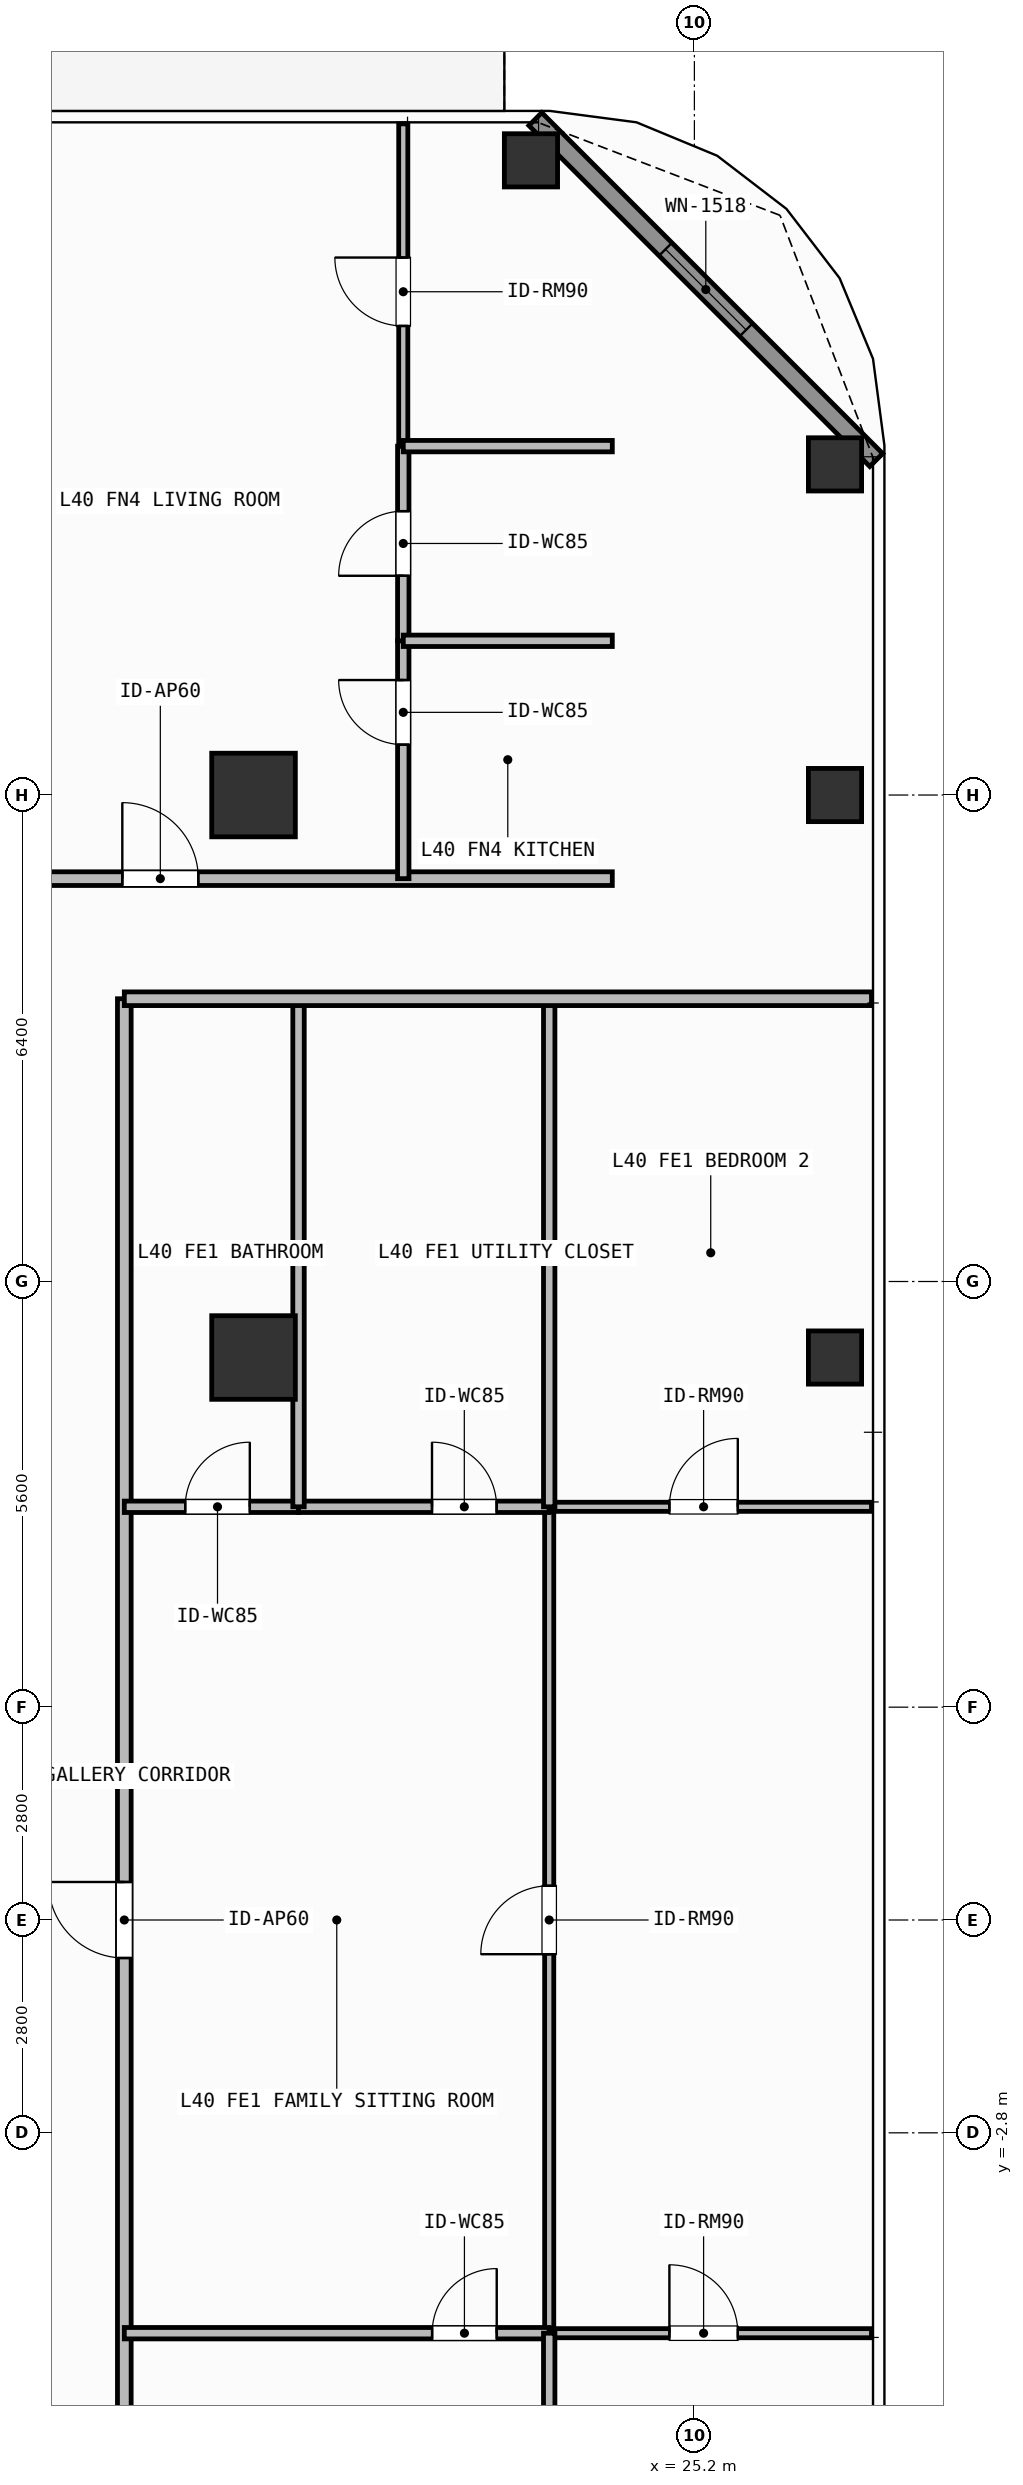
"""IFC4 building model, lengths in metres.
Left out: names, types, materials, properties, quantities, classifications, styles, units other than length and angle.
Written with IfcOpenShell. Run it as: python <this file> out.ifc"""

import sys

from ifc_helpers import new_model, si_unit, direction, frame, frame_2d, origin, origin_2d, place, context, subcontext, project, spatial, rectangle, hollow_rectangle, extrude, element, fill, save


model = new_model("IFC4")
c1 = context("Model", 3, precision=1e-05, world=origin(), true_north=direction((0.0, 1.0)))
c2 = subcontext(c1, "Body", "Model", "MODEL_VIEW")
j1 = project(units=[si_unit("LENGTHUNIT", "METRE"), si_unit("PLANEANGLEUNIT", "RADIAN")], contexts=[c1])
p1 = place(None, origin())
s1 = spatial("IfcSite", under=j1, at=p1, CompositionType="ELEMENT")
p2 = place(p1, origin())
s2 = spatial("IfcBuilding", under=s1, at=p2, CompositionType="ELEMENT")
p3 = place(p2, frame((0.0, 0.0, 164.1)))
s3 = spatial("IfcBuildingStorey", under=s2, at=p3, CompositionType="ELEMENT", Elevation=164.1)
for number, where, z_axis, x_axis in (
    (1, (19.4, 7.4, 0.0), (0.0, 0.0, 1.0), (1.0, 0.0, 0.0)),
    (2, (19.4, 14.8, 0.0), (0.0, 0.0, 1.0), (1.0, 0.0, 0.0)),
):
    element("IfcColumn", number, at=place(p3, frame(where, z_axis=z_axis, x_axis=x_axis)), inside=s3, PredefinedType="COLUMN", context=c2, shape_type="SweptSolid", body=[
        extrude(rectangle(XDim=1.1, YDim=1.1, at=origin_2d()), origin(), (0.0, 0.0, 1.0), 3.9),
    ])
for number, where, z_axis, x_axis in (
    (3, (23.05, 23.15, 0.0), (0.0, 0.0, 1.0), (1.0, 0.0, 0.0)),
    (4, (27.05, 19.15, 0.0), (0.0, 0.0, 1.0), (1.0, 0.0, 0.0)),
    (5, (27.05, 7.4, 0.0), (0.0, 0.0, 1.0), (1.0, 0.0, 0.0)),
    (6, (27.05, 14.8, 0.0), (0.0, 0.0, 1.0), (1.0, 0.0, 0.0)),
):
    element("IfcColumn", number, at=place(p3, frame(where, z_axis=z_axis, x_axis=x_axis)), inside=s3, PredefinedType="COLUMN", context=c2, shape_type="SweptSolid", body=[
        extrude(hollow_rectangle(XDim=0.7, YDim=0.7, WallThickness=0.032, at=origin_2d()), origin(), (0.0, 0.0, 1.0), 3.9),
    ])
p4 = place(p3, frame((23.108, 23.692, 0.0), z_axis=(0.0, 0.0, 1.0), x_axis=(0.707087534163, -0.707126027686, 0.0)))
e7 = element("IfcWall", 7, at=p4, inside=s3, PredefinedType="SOLIDWALL", context=c2, shape_type="SweptSolid", body=[
    extrude(rectangle(XDim=6.342, YDim=0.24, at=frame_2d((3.171, 0.0))), origin(), (0.0, 0.0, 1.0), 3.62),
])
p5 = place(p4, frame((2.421, 0.0, 0.8)))
e8 = element("IfcOpeningElement", 8, at=p5, cuts=e7, PredefinedType="OPENING", context=c2, shape_type="SweptSolid", body=[
    extrude(rectangle(XDim=1.5, YDim=1.85, at=frame_2d((0.75, 0.925))), frame((0.0, 0.13, 0.0), z_axis=(0.0, -1.0, 0.0), x_axis=(1.0, 0.0, 0.0)), (0.0, 0.0, 1.0), 0.26),
])
p6 = place(p3, frame((15.223, 13.7, 0.0), z_axis=(0.0, 0.0, 1.0), x_axis=(1.0, 0.0, 0.0)))
e9 = element("IfcWall", 9, at=p6, inside=s3, PredefinedType="PARTITIONING", context=c2, shape_type="SweptSolid", body=[
    extrude(rectangle(XDim=8.897, YDim=0.18, at=frame_2d((4.449, 0.0))), origin(), (0.0, 0.0, 1.0), 3.62),
])
p7 = place(p6, frame((2.451, 0.0, 0.0)))
e10 = element("IfcOpeningElement", 10, at=p7, cuts=e9, PredefinedType="OPENING", context=c2, shape_type="SweptSolid", body=[
    extrude(rectangle(XDim=1.0, YDim=2.2, at=frame_2d((0.5, 1.1))), frame((0.0, 0.1, 0.0), z_axis=(0.0, -1.0, 0.0), x_axis=(1.0, 0.0, 0.0)), (0.0, 0.0, 1.0), 0.2),
])
p8 = place(p3, frame((21.37, 13.7, 0.0), z_axis=(0.0, 0.0, 1.0), x_axis=(0.0, 1.0, 0.0)))
e11 = element("IfcWall", 11, at=p8, inside=s3, PredefinedType="PARTITIONING", context=c2, shape_type="SweptSolid", body=[
    extrude(rectangle(XDim=3.129, YDim=0.15, at=frame_2d((1.564, 0.0))), origin(), (0.0, 0.0, 1.0), 3.16),
])
p9 = place(p8, frame((1.763, 0.0, 0.0)))
e12 = element("IfcOpeningElement", 12, at=p9, cuts=e11, PredefinedType="OPENING", context=c2, shape_type="SweptSolid", body=[
    extrude(rectangle(XDim=0.85, YDim=2.1, at=frame_2d((0.425, 1.05))), frame((0.0, 0.085, 0.0), z_axis=(0.0, -1.0, 0.0), x_axis=(1.0, 0.0, 0.0)), (0.0, 0.0, 1.0), 0.17),
])
p10 = place(p3, frame((21.37, 16.829, 0.0), z_axis=(0.0, 0.0, 1.0), x_axis=(0.0, 1.0, 0.0)))
e13 = element("IfcWall", 13, at=p10, inside=s3, PredefinedType="PARTITIONING", context=c2, shape_type="SweptSolid", body=[
    extrude(rectangle(XDim=2.561, YDim=0.15, at=frame_2d((1.28, 0.0))), origin(), (0.0, 0.0, 1.0), 3.16),
])
p11 = place(p10, frame((0.855, 0.0, 0.0)))
e14 = element("IfcOpeningElement", 14, at=p11, cuts=e13, PredefinedType="OPENING", context=c2, shape_type="SweptSolid", body=[
    extrude(rectangle(XDim=0.85, YDim=2.1, at=frame_2d((0.425, 1.05))), frame((0.0, 0.085, 0.0), z_axis=(0.0, -1.0, 0.0), x_axis=(1.0, 0.0, 0.0)), (0.0, 0.0, 1.0), 0.17),
])
p12 = place(p3, frame((21.37, 19.39, 0.0), z_axis=(0.0, 0.0, 1.0), x_axis=(0.0, 1.0, 0.0)))
e15 = element("IfcWall", 15, at=p12, inside=s3, PredefinedType="PARTITIONING", context=c2, shape_type="SweptSolid", body=[
    extrude(rectangle(XDim=4.24, YDim=0.12, at=frame_2d((2.12, 0.0))), origin(), (0.0, 0.0, 1.0), 3.62),
])
p13 = place(p12, frame((1.581, 0.0, 0.0)))
e16 = element("IfcOpeningElement", 16, at=p13, cuts=e15, PredefinedType="OPENING", context=c2, shape_type="SweptSolid", body=[
    extrude(rectangle(XDim=0.9, YDim=2.1, at=frame_2d((0.45, 1.05))), frame((0.0, 0.07, 0.0), z_axis=(0.0, -1.0, 0.0), x_axis=(1.0, 0.0, 0.0)), (0.0, 0.0, 1.0), 0.14),
])
p14 = place(p3, frame((17.7, -12.12, 0.0), z_axis=(0.0, 0.0, 1.0), x_axis=(0.0, 1.0, 0.0)))
e17 = element("IfcWall", 17, at=p14, inside=s3, PredefinedType="PARTITIONING", context=c2, shape_type="SweptSolid", body=[
    extrude(rectangle(XDim=24.24, YDim=0.18, at=frame_2d((12.12, 0.0))), origin(), (0.0, 0.0, 1.0), 3.62),
])
p15 = place(p14, frame((11.62, 0.0, 0.0)))
e18 = element("IfcOpeningElement", 18, at=p15, cuts=e17, PredefinedType="OPENING", context=c2, shape_type="SweptSolid", body=[
    extrude(rectangle(XDim=1.0, YDim=2.2, at=frame_2d((0.5, 1.1))), frame((0.0, 0.1, 0.0), z_axis=(0.0, -1.0, 0.0), x_axis=(1.0, 0.0, 0.0)), (0.0, 0.0, 1.0), 0.2),
])
p16 = place(p3, frame((23.29, -5.436, 0.0), z_axis=(0.0, 0.0, 1.0), x_axis=(0.0, 1.0, 0.0)))
e19 = element("IfcWall", 19, at=p16, inside=s3, PredefinedType="PARTITIONING", context=c2, shape_type="SweptSolid", body=[
    extrude(rectangle(XDim=10.872, YDim=0.12, at=frame_2d((5.436, 0.0))), origin(), (0.0, 0.0, 1.0), 3.62),
])
p17 = place(p16, frame((4.986, 0.0, 0.0)))
e20 = element("IfcOpeningElement", 20, at=p17, cuts=e19, PredefinedType="OPENING", context=c2, shape_type="SweptSolid", body=[
    extrude(rectangle(XDim=0.9, YDim=2.1, at=frame_2d((0.45, 1.05))), frame((0.0, 0.07, 0.0), z_axis=(0.0, -1.0, 0.0), x_axis=(1.0, 0.0, 0.0)), (0.0, 0.0, 1.0), 0.14),
])
p18 = place(p3, frame((17.7, 5.436, 0.0), z_axis=(0.0, 0.0, 1.0), x_axis=(1.0, 0.0, 0.0)))
e21 = element("IfcWall", 21, at=p18, inside=s3, PredefinedType="PARTITIONING", context=c2, shape_type="SweptSolid", body=[
    extrude(rectangle(XDim=2.292, YDim=0.15, at=frame_2d((1.146, 0.0))), origin(), (0.0, 0.0, 1.0), 3.62),
])
p19 = place(p18, frame((0.801, 0.0, 0.0)))
e22 = element("IfcOpeningElement", 22, at=p19, cuts=e21, PredefinedType="OPENING", context=c2, shape_type="SweptSolid", body=[
    extrude(rectangle(XDim=0.85, YDim=2.1, at=frame_2d((0.425, 1.05))), frame((0.0, 0.085, 0.0), z_axis=(0.0, -1.0, 0.0), x_axis=(1.0, 0.0, 0.0)), (0.0, 0.0, 1.0), 0.17),
])
p20 = place(p3, frame((19.992, 5.436, 0.0), z_axis=(0.0, 0.0, 1.0), x_axis=(1.0, 0.0, 0.0)))
e23 = element("IfcWall", 23, at=p20, inside=s3, PredefinedType="PARTITIONING", context=c2, shape_type="SweptSolid", body=[
    extrude(rectangle(XDim=3.298, YDim=0.15, at=frame_2d((1.649, 0.0))), origin(), (0.0, 0.0, 1.0), 3.62),
])
p21 = place(p20, frame((1.756, 0.0, 0.0)))
e24 = element("IfcOpeningElement", 24, at=p21, cuts=e23, PredefinedType="OPENING", context=c2, shape_type="SweptSolid", body=[
    extrude(rectangle(XDim=0.85, YDim=2.1, at=frame_2d((0.425, 1.05))), frame((0.0, 0.085, 0.0), z_axis=(0.0, -1.0, 0.0), x_axis=(1.0, 0.0, 0.0)), (0.0, 0.0, 1.0), 0.17),
])
p22 = place(p3, frame((17.7, -5.436, 0.0), z_axis=(0.0, 0.0, 1.0), x_axis=(1.0, 0.0, 0.0)))
e25 = element("IfcWall", 25, at=p22, inside=s3, PredefinedType="PARTITIONING", context=c2, shape_type="SweptSolid", body=[
    extrude(rectangle(XDim=5.59, YDim=0.15, at=frame_2d((2.795, 0.0))), origin(), (0.0, 0.0, 1.0), 3.62),
])
p23 = place(p22, frame((4.05, 0.0, 0.0)))
e26 = element("IfcOpeningElement", 26, at=p23, cuts=e25, PredefinedType="OPENING", context=c2, shape_type="SweptSolid", body=[
    extrude(rectangle(XDim=0.85, YDim=2.1, at=frame_2d((0.425, 1.05))), frame((0.0, 0.085, 0.0), z_axis=(0.0, -1.0, 0.0), x_axis=(1.0, 0.0, 0.0)), (0.0, 0.0, 1.0), 0.17),
])
p24 = place(p3, frame((23.29, -5.436, 0.0), z_axis=(0.0, 0.0, 1.0), x_axis=(1.0, 0.0, 0.0)))
e27 = element("IfcWall", 27, at=p24, inside=s3, PredefinedType="PARTITIONING", context=c2, shape_type="SweptSolid", body=[
    extrude(rectangle(XDim=4.24, YDim=0.12, at=frame_2d((2.12, 0.0))), origin(), (0.0, 0.0, 1.0), 3.62),
])
p25 = place(p24, frame((1.581, 0.0, 0.0)))
e28 = element("IfcOpeningElement", 28, at=p25, cuts=e27, PredefinedType="OPENING", context=c2, shape_type="SweptSolid", body=[
    extrude(rectangle(XDim=0.9, YDim=2.1, at=frame_2d((0.45, 1.05))), frame((0.0, 0.07, 0.0), z_axis=(0.0, -1.0, 0.0), x_axis=(1.0, 0.0, 0.0)), (0.0, 0.0, 1.0), 0.14),
])
p26 = place(p3, frame((23.29, 5.436, 0.0), z_axis=(0.0, 0.0, 1.0), x_axis=(1.0, 0.0, 0.0)))
e29 = element("IfcWall", 29, at=p26, inside=s3, PredefinedType="PARTITIONING", context=c2, shape_type="SweptSolid", body=[
    extrude(rectangle(XDim=4.24, YDim=0.12, at=frame_2d((2.12, 0.0))), origin(), (0.0, 0.0, 1.0), 3.62),
])
p27 = place(p26, frame((1.581, 0.0, 0.0)))
e30 = element("IfcOpeningElement", 30, at=p27, cuts=e29, PredefinedType="OPENING", context=c2, shape_type="SweptSolid", body=[
    extrude(rectangle(XDim=0.9, YDim=2.1, at=frame_2d((0.45, 1.05))), frame((0.0, 0.07, 0.0), z_axis=(0.0, -1.0, 0.0), x_axis=(1.0, 0.0, 0.0)), (0.0, 0.0, 1.0), 0.14),
])
for number, where, z_axis, x_axis in (
    (31, (21.37, 16.829, 0.0), (0.0, 0.0, 1.0), (1.0, 0.0, 0.0)),
    (32, (21.37, 19.39, 0.0), (0.0, 0.0, 1.0), (1.0, 0.0, 0.0)),
):
    element("IfcWall", number, at=place(p3, frame(where, z_axis=z_axis, x_axis=x_axis)), inside=s3, PredefinedType="PARTITIONING", context=c2, shape_type="SweptSolid", body=[
        extrude(rectangle(XDim=2.75, YDim=0.15, at=frame_2d((1.375, 0.0))), origin(), (0.0, 0.0, 1.0), 3.62),
    ])
for number, where, z_axis, x_axis in (
    (33, (19.992, 5.436, 0.0), (0.0, 0.0, 1.0), (0.0, 1.0, 0.0)),
    (34, (23.29, -12.12, 0.0), (0.0, 0.0, 1.0), (0.0, 1.0, 0.0)),
    (35, (23.29, 5.436, 0.0), (0.0, 0.0, 1.0), (0.0, 1.0, 0.0)),
):
    element("IfcWall", number, at=place(p3, frame(where, z_axis=z_axis, x_axis=x_axis)), inside=s3, PredefinedType="PARTITIONING", context=c2, shape_type="SweptSolid", body=[
        extrude(rectangle(XDim=6.684, YDim=0.15, at=frame_2d((3.342, 0.0))), origin(), (0.0, 0.0, 1.0), 3.62),
    ])
p28 = place(p3, frame((17.7, 12.12, 0.0), z_axis=(0.0, 0.0, 1.0), x_axis=(1.0, 0.0, 0.0)))
e36 = element("IfcWall", 36, at=p28, inside=s3, PredefinedType="PARTITIONING", context=c2, shape_type="SweptSolid", body=[
    extrude(rectangle(XDim=9.83, YDim=0.18, at=frame_2d((4.915, 0.0))), origin(), (0.0, 0.0, 1.0), 3.62),
])
p29 = place(p5, origin())
e37 = element("IfcWindow", 37, at=p29, inside=s3, PartitioningType="SINGLE_PANEL", PredefinedType="WINDOW", context=c2, shape_type="SweptSolid", body=[
    extrude(rectangle(XDim=1.5, YDim=1.85, at=frame_2d((0.75, 0.925))), frame((0.0, 0.03, 0.0), z_axis=(0.0, -1.0, 0.0), x_axis=(1.0, 0.0, 0.0)), (0.0, 0.0, 1.0), 0.06),
])
fill(e8, e37)
p30 = place(p7, origin())
e38 = element("IfcDoor", 38, at=p30, inside=s3, OperationType="SINGLE_SWING_LEFT", PredefinedType="DOOR", context=c2, shape_type="SweptSolid", body=[
    extrude(rectangle(XDim=1.0, YDim=2.2, at=frame_2d((0.5, 1.1))), frame((0.0, 0.025, 0.0), z_axis=(0.0, -1.0, 0.0), x_axis=(1.0, 0.0, 0.0)), (0.0, 0.0, 1.0), 0.05),
])
fill(e10, e38)
p31 = place(p9, origin())
e39 = element("IfcDoor", 39, at=p31, inside=s3, OperationType="SINGLE_SWING_RIGHT", PredefinedType="DOOR", context=c2, shape_type="SweptSolid", body=[
    extrude(rectangle(XDim=0.85, YDim=2.1, at=frame_2d((0.425, 1.05))), frame((0.0, 0.025, 0.0), z_axis=(0.0, -1.0, 0.0), x_axis=(1.0, 0.0, 0.0)), (0.0, 0.0, 1.0), 0.05),
])
fill(e12, e39)
p32 = place(p11, origin())
e40 = element("IfcDoor", 40, at=p32, inside=s3, OperationType="SINGLE_SWING_LEFT", PredefinedType="DOOR", context=c2, shape_type="SweptSolid", body=[
    extrude(rectangle(XDim=0.85, YDim=2.1, at=frame_2d((0.425, 1.05))), frame((0.0, 0.025, 0.0), z_axis=(0.0, -1.0, 0.0), x_axis=(1.0, 0.0, 0.0)), (0.0, 0.0, 1.0), 0.05),
])
fill(e14, e40)
p33 = place(p13, origin())
e41 = element("IfcDoor", 41, at=p33, inside=s3, OperationType="SINGLE_SWING_RIGHT", PredefinedType="DOOR", context=c2, shape_type="SweptSolid", body=[
    extrude(rectangle(XDim=0.9, YDim=2.1, at=frame_2d((0.45, 1.05))), frame((0.0, 0.025, 0.0), z_axis=(0.0, -1.0, 0.0), x_axis=(1.0, 0.0, 0.0)), (0.0, 0.0, 1.0), 0.05),
])
fill(e16, e41)
p34 = place(p15, origin())
e42 = element("IfcDoor", 42, at=p34, inside=s3, OperationType="SINGLE_SWING_RIGHT", PredefinedType="DOOR", context=c2, shape_type="SweptSolid", body=[
    extrude(rectangle(XDim=1.0, YDim=2.2, at=frame_2d((0.5, 1.1))), frame((0.0, 0.025, 0.0), z_axis=(0.0, -1.0, 0.0), x_axis=(1.0, 0.0, 0.0)), (0.0, 0.0, 1.0), 0.05),
])
fill(e18, e42)
p35 = place(p17, origin())
e43 = element("IfcDoor", 43, at=p35, inside=s3, OperationType="SINGLE_SWING_LEFT", PredefinedType="DOOR", context=c2, shape_type="SweptSolid", body=[
    extrude(rectangle(XDim=0.9, YDim=2.1, at=frame_2d((0.45, 1.05))), frame((0.0, 0.025, 0.0), z_axis=(0.0, -1.0, 0.0), x_axis=(1.0, 0.0, 0.0)), (0.0, 0.0, 1.0), 0.05),
])
fill(e20, e43)
p36 = place(p19, origin())
e44 = element("IfcDoor", 44, at=p36, inside=s3, OperationType="SINGLE_SWING_RIGHT", PredefinedType="DOOR", context=c2, shape_type="SweptSolid", body=[
    extrude(rectangle(XDim=0.85, YDim=2.1, at=frame_2d((0.425, 1.05))), frame((0.0, 0.025, 0.0), z_axis=(0.0, -1.0, 0.0), x_axis=(1.0, 0.0, 0.0)), (0.0, 0.0, 1.0), 0.05),
])
fill(e22, e44)
p37 = place(p21, origin())
e45 = element("IfcDoor", 45, at=p37, inside=s3, OperationType="SINGLE_SWING_LEFT", PredefinedType="DOOR", context=c2, shape_type="SweptSolid", body=[
    extrude(rectangle(XDim=0.85, YDim=2.1, at=frame_2d((0.425, 1.05))), frame((0.0, 0.025, 0.0), z_axis=(0.0, -1.0, 0.0), x_axis=(1.0, 0.0, 0.0)), (0.0, 0.0, 1.0), 0.05),
])
fill(e24, e45)
p38 = place(p23, origin())
e46 = element("IfcDoor", 46, at=p38, inside=s3, OperationType="SINGLE_SWING_RIGHT", PredefinedType="DOOR", context=c2, shape_type="SweptSolid", body=[
    extrude(rectangle(XDim=0.85, YDim=2.1, at=frame_2d((0.425, 1.05))), frame((0.0, 0.025, 0.0), z_axis=(0.0, -1.0, 0.0), x_axis=(1.0, 0.0, 0.0)), (0.0, 0.0, 1.0), 0.05),
])
fill(e26, e46)
p39 = place(p25, origin())
e47 = element("IfcDoor", 47, at=p39, inside=s3, OperationType="SINGLE_SWING_LEFT", PredefinedType="DOOR", context=c2, shape_type="SweptSolid", body=[
    extrude(rectangle(XDim=0.9, YDim=2.1, at=frame_2d((0.45, 1.05))), frame((0.0, 0.025, 0.0), z_axis=(0.0, -1.0, 0.0), x_axis=(1.0, 0.0, 0.0)), (0.0, 0.0, 1.0), 0.05),
])
fill(e28, e47)
p40 = place(p27, origin())
e48 = element("IfcDoor", 48, at=p40, inside=s3, OperationType="SINGLE_SWING_RIGHT", PredefinedType="DOOR", context=c2, shape_type="SweptSolid", body=[
    extrude(rectangle(XDim=0.9, YDim=2.1, at=frame_2d((0.45, 1.05))), frame((0.0, 0.025, 0.0), z_axis=(0.0, -1.0, 0.0), x_axis=(1.0, 0.0, 0.0)), (0.0, 0.0, 1.0), 0.05),
])
fill(e30, e48)
save(model, sys.argv[1])
